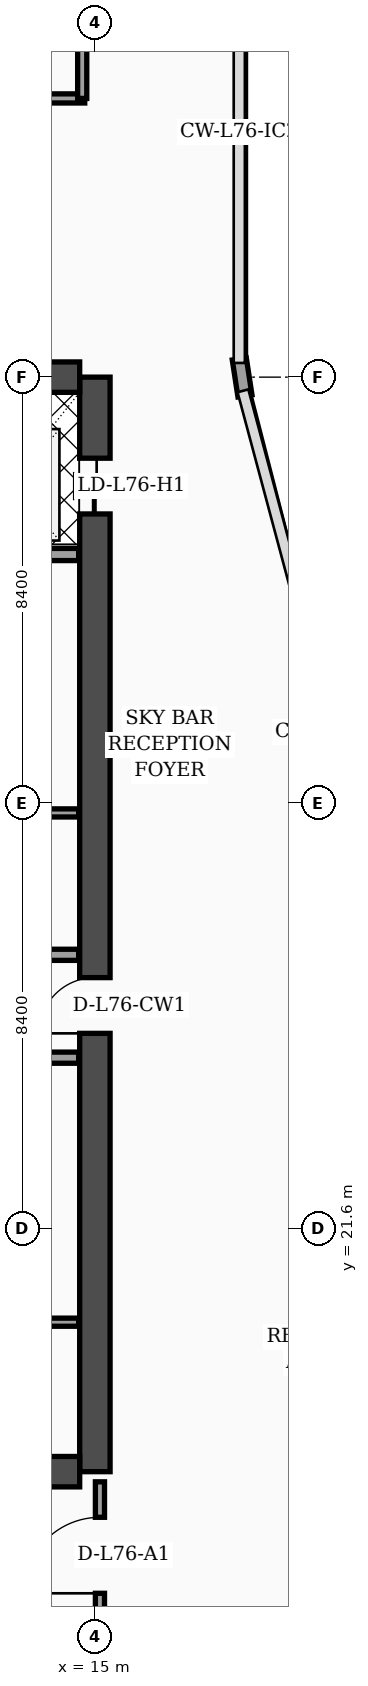
"""IFC4 building model, lengths in metres.
Left out: names, types, materials, properties, quantities, classifications, styles, units other than length and angle.
Written with IfcOpenShell. Run it as: python <this file> out.ifc"""

import sys

from ifc_helpers import new_model, si_unit, direction, frame, frame_2d, origin, place, context, subcontext, project, spatial, rectangle, extrude, element, fill, save


model = new_model("IFC4")
c1 = context("Model", 3, precision=1e-05, world=origin(), true_north=direction((0.0, 1.0)))
c2 = subcontext(c1, "Body", "Model", "MODEL_VIEW")
j1 = project(units=[si_unit("LENGTHUNIT", "METRE"), si_unit("PLANEANGLEUNIT", "RADIAN")], contexts=[c1])
p1 = place(None, origin())
s1 = spatial("IfcSite", under=j1, at=p1, CompositionType="ELEMENT")
p2 = place(p1, origin())
s2 = spatial("IfcBuilding", under=s1, at=p2, CompositionType="ELEMENT")
p3 = place(p2, frame((0.0, 0.0, 307.0)))
s3 = spatial("IfcBuildingStorey", under=s2, at=p3, CompositionType="ELEMENT", Elevation=307.0)
p4 = place(p3, frame((15.0, 16.8, 0.0), z_axis=(0.0, 0.0, 1.0), x_axis=(0.0, 1.0, 0.0)))
e1 = element("IfcWall", 1, at=p4, inside=s3, PredefinedType="SHEAR", context=c2, shape_type="SweptSolid", body=[
    extrude(rectangle(XDim=21.6, YDim=0.6, at=frame_2d((10.8, 0.0))), origin(), (0.0, 0.0, 1.0), 4.26),
])
p5 = place(p4, frame((8.65, 0.0, 0.0)))
e2 = element("IfcOpeningElement", 2, at=p5, cuts=e1, PredefinedType="OPENING", context=c2, shape_type="SweptSolid", body=[
    extrude(rectangle(XDim=1.1, YDim=2.2, at=frame_2d((0.55, 1.1))), frame((0.0, 0.31, 0.0), z_axis=(0.0, -1.0, 0.0), x_axis=(1.0, 0.0, 0.0)), (0.0, 0.0, 1.0), 0.62),
])
p6 = place(p4, frame((18.9, 0.0, 0.0)))
e3 = element("IfcOpeningElement", 3, at=p6, cuts=e1, PredefinedType="OPENING", context=c2, shape_type="SweptSolid", body=[
    extrude(rectangle(XDim=1.1, YDim=2.2, at=frame_2d((0.55, 1.1))), frame((0.0, 0.31, 0.0), z_axis=(0.0, -1.0, 0.0), x_axis=(1.0, 0.0, 0.0)), (0.0, 0.0, 1.0), 0.62),
])
p7 = place(p3, frame((4.5, 38.4, 0.0), z_axis=(0.0, 0.0, 1.0), x_axis=(1.0, 0.0, 0.0)))
e4 = element("IfcWall", 4, at=p7, inside=s3, PredefinedType="SHEAR", context=c2, shape_type="SweptSolid", body=[
    extrude(rectangle(XDim=10.2, YDim=0.6, at=frame_2d((5.1, 0.0))), origin(), (0.0, 0.0, 1.0), 4.26),
])
p8 = place(p7, frame((5.8, 0.0, 0.0)))
e5 = element("IfcOpeningElement", 5, at=p8, cuts=e4, PredefinedType="OPENING", context=c2, shape_type="SweptSolid", body=[
    extrude(rectangle(XDim=1.1, YDim=2.2, at=frame_2d((0.55, 1.1))), frame((0.0, 0.31, 0.0), z_axis=(0.0, -1.0, 0.0), x_axis=(1.0, 0.0, 0.0)), (0.0, 0.0, 1.0), 0.62),
])
p9 = place(p3, frame((4.5, 16.8, 0.0), z_axis=(0.0, 0.0, 1.0), x_axis=(1.0, 0.0, 0.0)))
e6 = element("IfcWall", 6, at=p9, inside=s3, PredefinedType="SHEAR", context=c2, shape_type="SweptSolid", body=[
    extrude(rectangle(XDim=10.2, YDim=0.6, at=frame_2d((5.1, 0.0))), origin(), (0.0, 0.0, 1.0), 4.26),
])
p10 = place(p3, frame((17.962, 38.03, 0.0), z_axis=(0.0, 0.0, 1.0), x_axis=(-0.15141125477, 0.988470855377, 0.0)))
e7 = element("IfcWall", 7, at=p10, inside=s3, PredefinedType="SOLIDWALL", context=c2, shape_type="SweptSolid", body=[
    extrude(rectangle(XDim=0.739, YDim=0.28, at=frame_2d((0.369, 0.0))), origin(), (0.0, 0.0, 1.0), 4.26),
])
p11 = place(p3, frame((9.68, 19.75, 0.0), z_axis=(0.0, 0.0, 1.0), x_axis=(1.0, 0.0, 0.0)))
e8 = element("IfcWall", 8, at=p11, inside=s3, PredefinedType="PARTITIONING", context=c2, shape_type="SweptSolid", body=[
    extrude(rectangle(XDim=5.0, YDim=0.16, at=frame_2d((2.5, 0.0))), origin(), (0.0, 0.0, 1.0), 4.26),
])
p12 = place(p11, frame((1.1, 0.0, 0.0)))
e9 = element("IfcOpeningElement", 9, at=p12, cuts=e8, PredefinedType="OPENING", context=c2, shape_type="SweptSolid", body=[
    extrude(rectangle(XDim=0.98, YDim=2.15, at=frame_2d((0.49, 1.075))), frame((0.0, 0.09, 0.0), z_axis=(0.0, -1.0, 0.0), x_axis=(1.0, 0.0, 0.0)), (0.0, 0.0, 1.0), 0.18),
])
p13 = place(p3, frame((9.68, 24.97, 0.0), z_axis=(0.0, 0.0, 1.0), x_axis=(1.0, 0.0, 0.0)))
e10 = element("IfcWall", 10, at=p13, inside=s3, PredefinedType="SOLIDWALL", context=c2, shape_type="SweptSolid", body=[
    extrude(rectangle(XDim=5.0, YDim=0.22, at=frame_2d((2.5, 0.0))), origin(), (0.0, 0.0, 1.0), 3.69),
])
p14 = place(p13, frame((0.9, 0.0, 0.0)))
e11 = element("IfcOpeningElement", 11, at=p14, cuts=e10, PredefinedType="OPENING", context=c2, shape_type="SweptSolid", body=[
    extrude(rectangle(XDim=0.98, YDim=2.15, at=frame_2d((0.49, 1.075))), frame((0.0, 0.12, 0.0), z_axis=(0.0, -1.0, 0.0), x_axis=(1.0, 0.0, 0.0)), (0.0, 0.0, 1.0), 0.24),
])
p15 = place(p3, frame((12.25, 27.0, 0.0), z_axis=(0.0, 0.0, 1.0), x_axis=(1.0, 0.0, 0.0)))
e12 = element("IfcWall", 12, at=p15, inside=s3, PredefinedType="SOLIDWALL", context=c2, shape_type="SweptSolid", body=[
    extrude(rectangle(XDim=2.43, YDim=0.22, at=frame_2d((1.215, 0.0))), origin(), (0.0, 0.0, 1.0), 4.26),
])
p16 = place(p3, frame((12.25, 29.8, 0.0), z_axis=(0.0, 0.0, 1.0), x_axis=(1.0, 0.0, 0.0)))
e13 = element("IfcWall", 13, at=p16, inside=s3, PredefinedType="PARTITIONING", context=c2, shape_type="SweptSolid", body=[
    extrude(rectangle(XDim=2.43, YDim=0.16, at=frame_2d((1.215, 0.0))), origin(), (0.0, 0.0, 1.0), 4.26),
])
p17 = place(p16, frame((0.55, 0.0, 0.0)))
e14 = element("IfcOpeningElement", 14, at=p17, cuts=e13, PredefinedType="OPENING", context=c2, shape_type="SweptSolid", body=[
    extrude(rectangle(XDim=0.98, YDim=2.15, at=frame_2d((0.49, 1.075))), frame((0.0, 0.09, 0.0), z_axis=(0.0, -1.0, 0.0), x_axis=(1.0, 0.0, 0.0)), (0.0, 0.0, 1.0), 0.18),
])
p18 = place(p3, frame((9.66, 34.9, 0.0), z_axis=(0.0, 0.0, 1.0), x_axis=(1.0, 0.0, 0.0)))
e15 = element("IfcWall", 15, at=p18, inside=s3, PredefinedType="SOLIDWALL", context=c2, shape_type="SweptSolid", body=[
    extrude(rectangle(XDim=5.02, YDim=0.24, at=frame_2d((2.51, 0.0))), origin(), (0.0, 0.0, 1.0), 4.26),
])
p19 = place(p3, frame((4.06, 43.9, 0.0), z_axis=(0.0, 0.0, 1.0), x_axis=(1.0, 0.0, 0.0)))
e16 = element("IfcWall", 16, at=p19, inside=s3, PredefinedType="PARTITIONING", context=c2, shape_type="SweptSolid", body=[
    extrude(rectangle(XDim=10.74, YDim=0.18, at=frame_2d((5.37, 0.0))), origin(), (0.0, 0.0, 1.0), 3.69),
])
p20 = place(p19, frame((0.55, 0.0, 0.0)))
e17 = element("IfcOpeningElement", 17, at=p20, cuts=e16, PredefinedType="OPENING", context=c2, shape_type="SweptSolid", body=[
    extrude(rectangle(XDim=1.02, YDim=2.2, at=frame_2d((0.51, 1.1))), frame((0.0, 0.1, 0.0), z_axis=(0.0, -1.0, 0.0), x_axis=(1.0, 0.0, 0.0)), (0.0, 0.0, 1.0), 0.2),
])
p21 = place(p19, frame((4.65, 0.0, 0.0)))
e18 = element("IfcOpeningElement", 18, at=p21, cuts=e16, PredefinedType="OPENING", context=c2, shape_type="SweptSolid", body=[
    extrude(rectangle(XDim=1.02, YDim=2.2, at=frame_2d((0.51, 1.1))), frame((0.0, 0.1, 0.0), z_axis=(0.0, -1.0, 0.0), x_axis=(1.0, 0.0, 0.0)), (0.0, 0.0, 1.0), 0.2),
])
p22 = place(p19, frame((8.4, 0.0, 0.0)))
e19 = element("IfcOpeningElement", 19, at=p22, cuts=e16, PredefinedType="OPENING", context=c2, shape_type="SweptSolid", body=[
    extrude(rectangle(XDim=1.02, YDim=2.2, at=frame_2d((0.51, 1.1))), frame((0.0, 0.1, 0.0), z_axis=(0.0, -1.0, 0.0), x_axis=(1.0, 0.0, 0.0)), (0.0, 0.0, 1.0), 0.2),
])
p23 = place(p3, frame((14.75, 43.9, 0.0), z_axis=(0.0, 0.0, 1.0), x_axis=(0.0, 1.0, 0.0)))
e20 = element("IfcWall", 20, at=p23, inside=s3, PredefinedType="PARTITIONING", context=c2, shape_type="SweptSolid", body=[
    extrude(rectangle(XDim=3.82, YDim=0.18, at=frame_2d((1.91, 0.0))), origin(), (0.0, 0.0, 1.0), 3.79),
])
p24 = place(p3, frame((15.1, 2.6, 0.0), z_axis=(0.0, 0.0, 1.0), x_axis=(0.0, 1.0, 0.0)))
e21 = element("IfcWall", 21, at=p24, inside=s3, PredefinedType="PARTITIONING", context=c2, shape_type="SweptSolid", body=[
    extrude(rectangle(XDim=14.0, YDim=0.18, at=frame_2d((7.0, 0.0))), origin(), (0.0, 0.0, 1.0), 3.29),
])
p25 = place(p24, frame((11.8, 0.0, 0.0)))
e22 = element("IfcOpeningElement", 22, at=p25, cuts=e21, PredefinedType="OPENING", context=c2, shape_type="SweptSolid", body=[
    extrude(rectangle(XDim=1.5, YDim=2.22, at=frame_2d((0.75, 1.11))), frame((0.0, 0.1, 0.0), z_axis=(0.0, -1.0, 0.0), x_axis=(1.0, 0.0, 0.0)), (0.0, 0.0, 1.0), 0.2),
])
p26 = place(p25, origin())
e23 = element("IfcDoor", 23, at=p26, inside=s3, OperationType="SINGLE_SWING_LEFT", PredefinedType="DOOR", context=c2, shape_type="SweptSolid", body=[
    extrude(rectangle(XDim=1.5, YDim=2.22, at=frame_2d((0.75, 1.11))), frame((0.0, 0.025, 0.0), z_axis=(0.0, -1.0, 0.0), x_axis=(1.0, 0.0, 0.0)), (0.0, 0.0, 1.0), 0.05),
])
fill(e22, e23)
p27 = place(p5, origin())
e24 = element("IfcDoor", 24, at=p27, inside=s3, OperationType="SINGLE_SWING_LEFT", PredefinedType="DOOR", context=c2, shape_type="SweptSolid", body=[
    extrude(rectangle(XDim=1.1, YDim=2.2, at=frame_2d((0.55, 1.1))), frame((0.0, 0.025, 0.0), z_axis=(0.0, -1.0, 0.0), x_axis=(1.0, 0.0, 0.0)), (0.0, 0.0, 1.0), 0.05),
])
fill(e2, e24)
p28 = place(p6, origin())
e25 = element("IfcDoor", 25, at=p28, inside=s3, OperationType="DOUBLE_DOOR_SLIDING", PredefinedType="DOOR", context=c2, shape_type="SweptSolid", body=[
    extrude(rectangle(XDim=1.1, YDim=2.2, at=frame_2d((0.55, 1.1))), frame((0.0, 0.025, 0.0), z_axis=(0.0, -1.0, 0.0), x_axis=(1.0, 0.0, 0.0)), (0.0, 0.0, 1.0), 0.05),
])
fill(e3, e25)
save(model, sys.argv[1])
